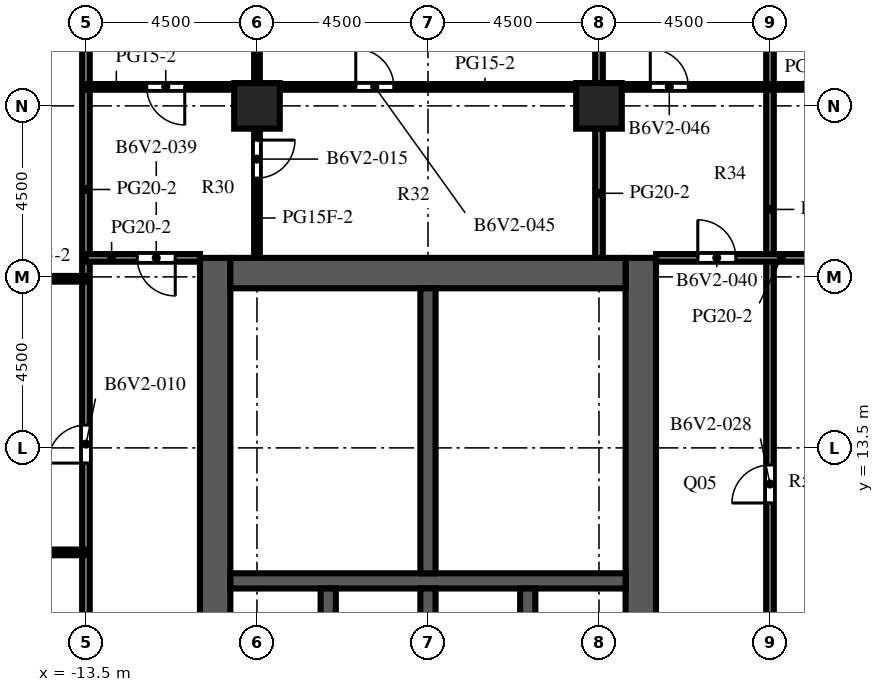
"""IFC4 building model, lengths in metres.
Left out: names, types, materials, properties, quantities, classifications, styles, units other than length and angle.
Written with IfcOpenShell. Run it as: python <this file> out.ifc"""

import sys

from ifc_helpers import new_model, si_unit, direction, frame, frame_2d, origin, origin_2d, place, context, subcontext, project, spatial, rectangle, extrude, element, fill, save


model = new_model("IFC4")
c1 = context("Model", 3, precision=1e-05, world=origin(), true_north=direction((0.0, 1.0)))
c2 = subcontext(c1, "Body", "Model", "MODEL_VIEW")
j1 = project(units=[si_unit("LENGTHUNIT", "METRE"), si_unit("PLANEANGLEUNIT", "RADIAN")], contexts=[c1])
p1 = place(None, origin())
s1 = spatial("IfcSite", under=j1, at=p1, CompositionType="ELEMENT")
p2 = place(p1, origin())
s2 = spatial("IfcBuilding", under=s1, at=p2, CompositionType="ELEMENT")
p3 = place(p2, frame((0.0, 0.0, 216.1)))
s3 = spatial("IfcBuildingStorey", under=s2, at=p3, CompositionType="ELEMENT", Elevation=216.1)
for number, where, z_axis, x_axis in (
    (1, (-9.0, 22.5, 0.0), (0.0, 0.0, 1.0), (1.0, 0.0, 0.0)),
    (2, (0.0, 22.5, 0.0), (0.0, 0.0, 1.0), (1.0, 0.0, 0.0)),
):
    element("IfcColumn", number, at=place(p3, frame(where, z_axis=z_axis, x_axis=x_axis)), inside=s3, PredefinedType="COLUMN", context=c2, shape_type="SweptSolid", body=[
        extrude(rectangle(XDim=1.2, YDim=1.2, at=origin_2d()), origin(), (0.0, 0.0, 1.0), 4.1),
    ])
p4 = place(p3, frame((-10.1, -9.0, 0.0), z_axis=(0.0, 0.0, 1.0), x_axis=(0.0, 1.0, 0.0)))
e3 = element("IfcWall", 3, at=p4, inside=s3, PredefinedType="SHEAR", context=c2, shape_type="SweptSolid", body=[
    extrude(rectangle(XDim=27.5, YDim=0.8, at=frame_2d((13.75, 0.0))), origin(), (0.0, 0.0, 1.0), 4.1),
])
p5 = place(p4, frame((12.55, 0.0, 0.0)))
e4 = element("IfcOpeningElement", 4, at=p5, cuts=e3, PredefinedType="OPENING", context=c2, shape_type="SweptSolid", body=[
    extrude(rectangle(XDim=2.4, YDim=2.4, at=frame_2d((1.2, 1.2))), frame((0.0, 0.41, 0.0), z_axis=(0.0, -1.0, 0.0), x_axis=(1.0, 0.0, 0.0)), (0.0, 0.0, 1.0), 0.82),
])
p6 = place(p4, frame((6.825, 0.0, 0.0)))
e5 = element("IfcOpeningElement", 5, at=p6, cuts=e3, PredefinedType="OPENING", context=c2, shape_type="SweptSolid", body=[
    extrude(rectangle(XDim=1.2, YDim=2.1, at=frame_2d((0.6, 1.05))), frame((0.0, 0.41, 0.0), z_axis=(0.0, -1.0, 0.0), x_axis=(1.0, 0.0, 0.0)), (0.0, 0.0, 1.0), 0.82),
])
p7 = place(p4, frame((19.475, 0.0, 0.0)))
e6 = element("IfcOpeningElement", 6, at=p7, cuts=e3, PredefinedType="OPENING", context=c2, shape_type="SweptSolid", body=[
    extrude(rectangle(XDim=1.2, YDim=2.1, at=frame_2d((0.6, 1.05))), frame((0.0, 0.41, 0.0), z_axis=(0.0, -1.0, 0.0), x_axis=(1.0, 0.0, 0.0)), (0.0, 0.0, 1.0), 0.82),
])
p8 = place(p3, frame((1.1, -9.0, 0.0), z_axis=(0.0, 0.0, 1.0), x_axis=(0.0, 1.0, 0.0)))
e7 = element("IfcWall", 7, at=p8, inside=s3, PredefinedType="SHEAR", context=c2, shape_type="SweptSolid", body=[
    extrude(rectangle(XDim=27.5, YDim=0.8, at=frame_2d((13.75, 0.0))), origin(), (0.0, 0.0, 1.0), 4.1),
])
p9 = place(p8, frame((12.55, 0.0, 0.0)))
e8 = element("IfcOpeningElement", 8, at=p9, cuts=e7, PredefinedType="OPENING", context=c2, shape_type="SweptSolid", body=[
    extrude(rectangle(XDim=2.4, YDim=2.4, at=frame_2d((1.2, 1.2))), frame((0.0, 0.41, 0.0), z_axis=(0.0, -1.0, 0.0), x_axis=(1.0, 0.0, 0.0)), (0.0, 0.0, 1.0), 0.82),
])
p10 = place(p8, frame((5.5, 0.0, 0.0)))
e9 = element("IfcOpeningElement", 9, at=p10, cuts=e7, PredefinedType="OPENING", context=c2, shape_type="SweptSolid", body=[
    extrude(rectangle(XDim=0.95, YDim=2.1, at=frame_2d((0.475, 1.05))), frame((0.0, 0.41, 0.0), z_axis=(0.0, -1.0, 0.0), x_axis=(1.0, 0.0, 0.0)), (0.0, 0.0, 1.0), 0.82),
])
p11 = place(p8, frame((23.475, 0.0, 0.0)))
e10 = element("IfcOpeningElement", 10, at=p11, cuts=e7, PredefinedType="OPENING", context=c2, shape_type="SweptSolid", body=[
    extrude(rectangle(XDim=1.2, YDim=2.1, at=frame_2d((0.6, 1.05))), frame((0.0, 0.41, 0.0), z_axis=(0.0, -1.0, 0.0), x_axis=(1.0, 0.0, 0.0)), (0.0, 0.0, 1.0), 0.82),
])
p12 = place(p3, frame((-9.7, 18.1, 0.0), z_axis=(0.0, 0.0, 1.0), x_axis=(1.0, 0.0, 0.0)))
e11 = element("IfcWall", 11, at=p12, inside=s3, PredefinedType="SHEAR", context=c2, shape_type="SweptSolid", body=[
    extrude(rectangle(XDim=10.4, YDim=0.8, at=frame_2d((5.2, 0.0))), origin(), (0.0, 0.0, 1.0), 4.1),
])
p13 = place(p3, frame((-9.7, 10.0, 0.0), z_axis=(0.0, 0.0, 1.0), x_axis=(1.0, 0.0, 0.0)))
e12 = element("IfcWall", 12, at=p13, inside=s3, PredefinedType="SHEAR", context=c2, shape_type="SweptSolid", body=[
    extrude(rectangle(XDim=10.4, YDim=0.4, at=frame_2d((5.2, 0.0))), origin(), (0.0, 0.0, 1.0), 4.1),
])
for number, where, z_axis, x_axis in (
    (13, (-7.125, 6.9, 0.0), (0.0, 0.0, 1.0), (0.0, 1.0, 0.0)),
    (14, (-4.5, 6.9, 0.0), (0.0, 0.0, 1.0), (0.0, 1.0, 0.0)),
    (15, (-1.875, 6.9, 0.0), (0.0, 0.0, 1.0), (0.0, 1.0, 0.0)),
):
    element("IfcWall", number, at=place(p3, frame(where, z_axis=z_axis, x_axis=x_axis)), inside=s3, PredefinedType="SHEAR", context=c2, shape_type="SweptSolid", body=[
        extrude(rectangle(XDim=2.9, YDim=0.4, at=frame_2d((1.45, 0.0))), origin(), (0.0, 0.0, 1.0), 4.1),
    ])
p14 = place(p3, frame((-4.5, 10.2, 0.0), z_axis=(0.0, 0.0, 1.0), x_axis=(0.0, 1.0, 0.0)))
e16 = element("IfcWall", 16, at=p14, inside=s3, PredefinedType="SHEAR", context=c2, shape_type="SweptSolid", body=[
    extrude(rectangle(XDim=7.5, YDim=0.4, at=frame_2d((3.75, 0.0))), origin(), (0.0, 0.0, 1.0), 4.1),
])
p15 = place(p3, frame((-0.6, 12.45, 0.0), z_axis=(0.0, 0.0, 1.0), x_axis=(1.0, 0.0, 0.0)))
e17 = element("IfcWall", 17, at=p15, inside=s3, PredefinedType="PARTITIONING", context=c2, shape_type="SweptSolid", body=[
    extrude(rectangle(XDim=1.3, YDim=0.1, at=frame_2d((0.65, 0.0))), origin(), (0.0, 0.0, 1.0), 3.5),
])
p16 = place(p15, frame((0.2, 0.0, 0.0)))
e18 = element("IfcOpeningElement", 18, at=p16, cuts=e17, PredefinedType="OPENING", context=c2, shape_type="SweptSolid", body=[
    extrude(rectangle(XDim=0.9, YDim=2.1, at=frame_2d((0.45, 1.05))), frame((0.0, 0.06, 0.0), z_axis=(0.0, -1.0, 0.0), x_axis=(1.0, 0.0, 0.0)), (0.0, 0.0, 1.0), 0.12),
])
p17 = place(p3, frame((-4.3, 12.45, 0.0), z_axis=(0.0, 0.0, 1.0), x_axis=(1.0, 0.0, 0.0)))
e19 = element("IfcWall", 19, at=p17, inside=s3, PredefinedType="PARTITIONING", context=c2, shape_type="SweptSolid", body=[
    extrude(rectangle(XDim=3.7, YDim=0.1, at=frame_2d((1.85, 0.0))), origin(), (0.0, 0.0, 1.0), 3.5),
])
p18 = place(p3, frame((-0.6, 12.45, 0.0), z_axis=(0.0, 0.0, 1.0), x_axis=(0.0, 1.0, 0.0)))
e20 = element("IfcWall", 20, at=p18, inside=s3, PredefinedType="PARTITIONING", context=c2, shape_type="SweptSolid", body=[
    extrude(rectangle(XDim=2.625, YDim=0.1, at=frame_2d((1.312, 0.0))), origin(), (0.0, 0.0, 1.0), 3.5),
])
p19 = place(p18, frame((0.812, 0.0, 0.0)))
e21 = element("IfcOpeningElement", 21, at=p19, cuts=e20, PredefinedType="OPENING", context=c2, shape_type="SweptSolid", body=[
    extrude(rectangle(XDim=1.0, YDim=2.1, at=frame_2d((0.5, 1.05))), frame((0.0, 0.06, 0.0), z_axis=(0.0, -1.0, 0.0), x_axis=(1.0, 0.0, 0.0)), (0.0, 0.0, 1.0), 0.12),
])
p20 = place(p3, frame((-0.6, 15.075, 0.0), z_axis=(0.0, 0.0, 1.0), x_axis=(0.0, 1.0, 0.0)))
e22 = element("IfcWall", 22, at=p20, inside=s3, PredefinedType="PARTITIONING", context=c2, shape_type="SweptSolid", body=[
    extrude(rectangle(XDim=2.625, YDim=0.1, at=frame_2d((1.312, 0.0))), origin(), (0.0, 0.0, 1.0), 3.5),
])
p21 = place(p20, frame((0.812, 0.0, 0.0)))
e23 = element("IfcOpeningElement", 23, at=p21, cuts=e22, PredefinedType="OPENING", context=c2, shape_type="SweptSolid", body=[
    extrude(rectangle(XDim=1.0, YDim=2.1, at=frame_2d((0.5, 1.05))), frame((0.0, 0.06, 0.0), z_axis=(0.0, -1.0, 0.0), x_axis=(1.0, 0.0, 0.0)), (0.0, 0.0, 1.0), 0.12),
])
p22 = place(p3, frame((-4.3, 15.075, 0.0), z_axis=(0.0, 0.0, 1.0), x_axis=(1.0, 0.0, 0.0)))
e24 = element("IfcWall", 24, at=p22, inside=s3, PredefinedType="PARTITIONING", context=c2, shape_type="SweptSolid", body=[
    extrude(rectangle(XDim=3.7, YDim=0.1, at=frame_2d((1.85, 0.0))), origin(), (0.0, 0.0, 1.0), 3.5),
])
p23 = place(p3, frame((-13.5, 6.25, 0.0), z_axis=(0.0, 0.0, 1.0), x_axis=(0.0, 1.0, 0.0)))
e25 = element("IfcWall", 25, at=p23, inside=s3, PredefinedType="PARTITIONING", context=c2, shape_type="SweptSolid", body=[
    extrude(rectangle(XDim=20.25, YDim=0.2, at=frame_2d((10.125, 0.0))), origin(), (0.0, 0.0, 1.0), 3.5),
])
p24 = place(p23, frame((6.85, 0.0, 0.0)))
e26 = element("IfcOpeningElement", 26, at=p24, cuts=e25, PredefinedType="OPENING", context=c2, shape_type="SweptSolid", body=[
    extrude(rectangle(XDim=1.0, YDim=2.1, at=frame_2d((0.5, 1.05))), frame((0.0, 0.11, 0.0), z_axis=(0.0, -1.0, 0.0), x_axis=(1.0, 0.0, 0.0)), (0.0, 0.0, 1.0), 0.22),
])
p25 = place(p3, frame((-9.0, 21.9, 0.0), z_axis=(0.0, 0.0, 1.0), x_axis=(0.0, -1.0, 0.0)))
e27 = element("IfcWall", 27, at=p25, inside=s3, PredefinedType="PARTITIONING", context=c2, shape_type="SweptSolid", body=[
    extrude(rectangle(XDim=3.4, YDim=0.15, at=frame_2d((1.7, 0.0))), origin(), (0.0, 0.0, 1.0), 3.5),
])
p26 = place(p25, frame((0.3, 0.0, 0.0)))
e28 = element("IfcOpeningElement", 28, at=p26, cuts=e27, PredefinedType="OPENING", context=c2, shape_type="SweptSolid", body=[
    extrude(rectangle(XDim=1.0, YDim=2.1, at=frame_2d((0.5, 1.05))), frame((0.0, 0.085, 0.0), z_axis=(0.0, -1.0, 0.0), x_axis=(1.0, 0.0, 0.0)), (0.0, 0.0, 1.0), 0.17),
])
p27 = place(p3, frame((-9.0, 23.1, 0.0), z_axis=(0.0, 0.0, 1.0), x_axis=(0.0, 1.0, 0.0)))
e29 = element("IfcWall", 29, at=p27, inside=s3, PredefinedType="PARTITIONING", context=c2, shape_type="SweptSolid", body=[
    extrude(rectangle(XDim=3.4, YDim=0.15, at=frame_2d((1.7, 0.0))), origin(), (0.0, 0.0, 1.0), 3.5),
])
for number, where, z_axis, x_axis in (
    (30, (0.0, 18.5, 0.0), (0.0, 0.0, 1.0), (0.0, 1.0, 0.0)),
    (31, (0.0, 23.1, 0.0), (0.0, 0.0, 1.0), (0.0, 1.0, 0.0)),
):
    element("IfcWall", number, at=place(p3, frame(where, z_axis=z_axis, x_axis=x_axis)), inside=s3, PredefinedType="PARTITIONING", context=c2, shape_type="SweptSolid", body=[
        extrude(rectangle(XDim=3.4, YDim=0.2, at=frame_2d((1.7, 0.0))), origin(), (0.0, 0.0, 1.0), 3.5),
    ])
p28 = place(p3, frame((4.5, 26.5, 0.0), z_axis=(0.0, 0.0, 1.0), x_axis=(0.0, -1.0, 0.0)))
e32 = element("IfcWall", 32, at=p28, inside=s3, PredefinedType="PARTITIONING", context=c2, shape_type="SweptSolid", body=[
    extrude(rectangle(XDim=19.8, YDim=0.2, at=frame_2d((9.9, 0.0))), origin(), (0.0, 0.0, 1.0), 3.5),
])
p29 = place(p28, frame((13.45, 0.0, 0.0)))
e33 = element("IfcOpeningElement", 33, at=p29, cuts=e32, PredefinedType="OPENING", context=c2, shape_type="SweptSolid", body=[
    extrude(rectangle(XDim=1.0, YDim=2.1, at=frame_2d((0.5, 1.05))), frame((0.0, 0.11, 0.0), z_axis=(0.0, -1.0, 0.0), x_axis=(1.0, 0.0, 0.0)), (0.0, 0.0, 1.0), 0.22),
])
p30 = place(p3, frame((-22.35, 10.75, 0.0), z_axis=(0.0, 0.0, 1.0), x_axis=(1.0, 0.0, 0.0)))
e34 = element("IfcWall", 34, at=p30, inside=s3, PredefinedType="PARTITIONING", context=c2, shape_type="SweptSolid", body=[
    extrude(rectangle(XDim=8.85, YDim=0.15, at=frame_2d((4.425, 0.0))), origin(), (0.0, 0.0, 1.0), 3.5),
])
p31 = place(p30, frame((1.2, 0.0, 0.0)))
e35 = element("IfcOpeningElement", 35, at=p31, cuts=e34, PredefinedType="OPENING", context=c2, shape_type="SweptSolid", body=[
    extrude(rectangle(XDim=1.0, YDim=2.1, at=frame_2d((0.5, 1.05))), frame((0.0, 0.085, 0.0), z_axis=(0.0, -1.0, 0.0), x_axis=(1.0, 0.0, 0.0)), (0.0, 0.0, 1.0), 0.17),
])
p32 = place(p30, frame((5.7, 0.0, 0.0)))
e36 = element("IfcOpeningElement", 36, at=p32, cuts=e34, PredefinedType="OPENING", context=c2, shape_type="SweptSolid", body=[
    extrude(rectangle(XDim=1.0, YDim=2.1, at=frame_2d((0.5, 1.05))), frame((0.0, 0.085, 0.0), z_axis=(0.0, -1.0, 0.0), x_axis=(1.0, 0.0, 0.0)), (0.0, 0.0, 1.0), 0.17),
])
p33 = place(p3, frame((-17.4, 17.95, 0.0), z_axis=(0.0, 0.0, 1.0), x_axis=(1.0, 0.0, 0.0)))
e37 = element("IfcWall", 37, at=p33, inside=s3, PredefinedType="PARTITIONING", context=c2, shape_type="SweptSolid", body=[
    extrude(rectangle(XDim=3.9, YDim=0.15, at=frame_2d((1.95, 0.0))), origin(), (0.0, 0.0, 1.0), 3.5),
])
p34 = place(p33, frame((0.5, 0.0, 0.0)))
e38 = element("IfcOpeningElement", 38, at=p34, cuts=e37, PredefinedType="OPENING", context=c2, shape_type="SweptSolid", body=[
    extrude(rectangle(XDim=1.0, YDim=2.1, at=frame_2d((0.5, 1.05))), frame((0.0, 0.085, 0.0), z_axis=(0.0, -1.0, 0.0), x_axis=(1.0, 0.0, 0.0)), (0.0, 0.0, 1.0), 0.17),
])
p35 = place(p3, frame((-13.5, 18.5, 0.0), z_axis=(0.0, 0.0, 1.0), x_axis=(1.0, 0.0, 0.0)))
e39 = element("IfcWall", 39, at=p35, inside=s3, PredefinedType="PARTITIONING", context=c2, shape_type="SweptSolid", body=[
    extrude(rectangle(XDim=3.0, YDim=0.2, at=frame_2d((1.5, 0.0))), origin(), (0.0, 0.0, 1.0), 3.5),
])
p36 = place(p35, frame((1.35, 0.0, 0.0)))
e40 = element("IfcOpeningElement", 40, at=p36, cuts=e39, PredefinedType="OPENING", context=c2, shape_type="SweptSolid", body=[
    extrude(rectangle(XDim=1.0, YDim=2.1, at=frame_2d((0.5, 1.05))), frame((0.0, 0.11, 0.0), z_axis=(0.0, -1.0, 0.0), x_axis=(1.0, 0.0, 0.0)), (0.0, 0.0, 1.0), 0.22),
])
p37 = place(p3, frame((1.5, 18.5, 0.0), z_axis=(0.0, 0.0, 1.0), x_axis=(1.0, 0.0, 0.0)))
e41 = element("IfcWall", 41, at=p37, inside=s3, PredefinedType="PARTITIONING", context=c2, shape_type="SweptSolid", body=[
    extrude(rectangle(XDim=4.5, YDim=0.2, at=frame_2d((2.25, 0.0))), origin(), (0.0, 0.0, 1.0), 3.5),
])
p38 = place(p37, frame((1.1, 0.0, 0.0)))
e42 = element("IfcOpeningElement", 42, at=p38, cuts=e41, PredefinedType="OPENING", context=c2, shape_type="SweptSolid", body=[
    extrude(rectangle(XDim=1.0, YDim=2.1, at=frame_2d((0.5, 1.05))), frame((0.0, 0.11, 0.0), z_axis=(0.0, -1.0, 0.0), x_axis=(1.0, 0.0, 0.0)), (0.0, 0.0, 1.0), 0.22),
])
p39 = place(p3, frame((-13.5, 23.0, 0.0), z_axis=(0.0, 0.0, 1.0), x_axis=(1.0, 0.0, 0.0)))
e43 = element("IfcWall", 43, at=p39, inside=s3, PredefinedType="PARTITIONING", context=c2, shape_type="SweptSolid", body=[
    extrude(rectangle(XDim=3.9, YDim=0.15, at=frame_2d((1.95, 0.0))), origin(), (0.0, 0.0, 1.0), 3.5),
])
p40 = place(p39, frame((1.6, 0.0, 0.0)))
e44 = element("IfcOpeningElement", 44, at=p40, cuts=e43, PredefinedType="OPENING", context=c2, shape_type="SweptSolid", body=[
    extrude(rectangle(XDim=1.0, YDim=2.1, at=frame_2d((0.5, 1.05))), frame((0.0, 0.085, 0.0), z_axis=(0.0, -1.0, 0.0), x_axis=(1.0, 0.0, 0.0)), (0.0, 0.0, 1.0), 0.17),
])
p41 = place(p3, frame((-8.4, 23.0, 0.0), z_axis=(0.0, 0.0, 1.0), x_axis=(1.0, 0.0, 0.0)))
e45 = element("IfcWall", 45, at=p41, inside=s3, PredefinedType="PARTITIONING", context=c2, shape_type="SweptSolid", body=[
    extrude(rectangle(XDim=7.8, YDim=0.15, at=frame_2d((3.9, 0.0))), origin(), (0.0, 0.0, 1.0), 3.5),
])
p42 = place(p41, frame((2.0, 0.0, 0.0)))
e46 = element("IfcOpeningElement", 46, at=p42, cuts=e45, PredefinedType="OPENING", context=c2, shape_type="SweptSolid", body=[
    extrude(rectangle(XDim=1.0, YDim=2.1, at=frame_2d((0.5, 1.05))), frame((0.0, 0.085, 0.0), z_axis=(0.0, -1.0, 0.0), x_axis=(1.0, 0.0, 0.0)), (0.0, 0.0, 1.0), 0.17),
])
p43 = place(p3, frame((0.6, 23.0, 0.0), z_axis=(0.0, 0.0, 1.0), x_axis=(1.0, 0.0, 0.0)))
e47 = element("IfcWall", 47, at=p43, inside=s3, PredefinedType="PARTITIONING", context=c2, shape_type="SweptSolid", body=[
    extrude(rectangle(XDim=7.8, YDim=0.15, at=frame_2d((3.9, 0.0))), origin(), (0.0, 0.0, 1.0), 3.5),
])
p44 = place(p43, frame((0.75, 0.0, 0.0)))
e48 = element("IfcOpeningElement", 48, at=p44, cuts=e47, PredefinedType="OPENING", context=c2, shape_type="SweptSolid", body=[
    extrude(rectangle(XDim=1.0, YDim=2.1, at=frame_2d((0.5, 1.05))), frame((0.0, 0.085, 0.0), z_axis=(0.0, -1.0, 0.0), x_axis=(1.0, 0.0, 0.0)), (0.0, 0.0, 1.0), 0.17),
])
p45 = place(p7, origin())
e49 = element("IfcDoor", 49, at=p45, inside=s3, OperationType="SINGLE_SWING_LEFT", PredefinedType="DOOR", context=c2, shape_type="SweptSolid", body=[
    extrude(rectangle(XDim=1.2, YDim=2.1, at=frame_2d((0.6, 1.05))), frame((0.0, 0.025, 0.0), z_axis=(0.0, -1.0, 0.0), x_axis=(1.0, 0.0, 0.0)), (0.0, 0.0, 1.0), 0.05),
])
fill(e6, e49)
p46 = place(p16, origin())
e50 = element("IfcDoor", 50, at=p46, inside=s3, OperationType="SINGLE_SWING_LEFT", PredefinedType="DOOR", context=c2, shape_type="SweptSolid", body=[
    extrude(rectangle(XDim=0.9, YDim=2.1, at=frame_2d((0.45, 1.05))), frame((0.0, 0.025, 0.0), z_axis=(0.0, -1.0, 0.0), x_axis=(1.0, 0.0, 0.0)), (0.0, 0.0, 1.0), 0.05),
])
fill(e18, e50)
p47 = place(p11, origin())
e51 = element("IfcDoor", 51, at=p47, inside=s3, OperationType="SINGLE_SWING_RIGHT", PredefinedType="DOOR", context=c2, shape_type="SweptSolid", body=[
    extrude(rectangle(XDim=1.2, YDim=2.1, at=frame_2d((0.6, 1.05))), frame((0.0, 0.375, 0.0), z_axis=(0.0, -1.0, 0.0), x_axis=(1.0, 0.0, 0.0)), (0.0, 0.0, 1.0), 0.05),
])
fill(e10, e51)
p48 = place(p19, origin())
e52 = element("IfcDoor", 52, at=p48, inside=s3, OperationType="SINGLE_SWING_LEFT", PredefinedType="DOOR", context=c2, shape_type="SweptSolid", body=[
    extrude(rectangle(XDim=1.0, YDim=2.1, at=frame_2d((0.5, 1.05))), frame((0.0, 0.025, 0.0), z_axis=(0.0, -1.0, 0.0), x_axis=(1.0, 0.0, 0.0)), (0.0, 0.0, 1.0), 0.05),
])
fill(e21, e52)
p49 = place(p21, origin())
e53 = element("IfcDoor", 53, at=p49, inside=s3, OperationType="SINGLE_SWING_RIGHT", PredefinedType="DOOR", context=c2, shape_type="SweptSolid", body=[
    extrude(rectangle(XDim=1.0, YDim=2.1, at=frame_2d((0.5, 1.05))), frame((0.0, 0.025, 0.0), z_axis=(0.0, -1.0, 0.0), x_axis=(1.0, 0.0, 0.0)), (0.0, 0.0, 1.0), 0.05),
])
fill(e23, e53)
p50 = place(p24, origin())
e54 = element("IfcDoor", 54, at=p50, inside=s3, OperationType="SINGLE_SWING_LEFT", PredefinedType="DOOR", context=c2, shape_type="SweptSolid", body=[
    extrude(rectangle(XDim=1.0, YDim=2.1, at=frame_2d((0.5, 1.05))), frame((0.0, 0.025, 0.0), z_axis=(0.0, -1.0, 0.0), x_axis=(1.0, 0.0, 0.0)), (0.0, 0.0, 1.0), 0.05),
])
fill(e26, e54)
p51 = place(p26, origin())
e55 = element("IfcDoor", 55, at=p51, inside=s3, OperationType="SINGLE_SWING_LEFT", PredefinedType="DOOR", context=c2, shape_type="SweptSolid", body=[
    extrude(rectangle(XDim=1.0, YDim=2.1, at=frame_2d((0.5, 1.05))), frame((0.0, 0.025, 0.0), z_axis=(0.0, -1.0, 0.0), x_axis=(1.0, 0.0, 0.0)), (0.0, 0.0, 1.0), 0.05),
])
fill(e28, e55)
p52 = place(p29, origin())
e56 = element("IfcDoor", 56, at=p52, inside=s3, OperationType="SINGLE_SWING_RIGHT", PredefinedType="DOOR", context=c2, shape_type="SweptSolid", body=[
    extrude(rectangle(XDim=1.0, YDim=2.1, at=frame_2d((0.5, 1.05))), frame((0.0, 0.025, 0.0), z_axis=(0.0, -1.0, 0.0), x_axis=(1.0, 0.0, 0.0)), (0.0, 0.0, 1.0), 0.05),
])
fill(e33, e56)
p53 = place(p36, origin())
e57 = element("IfcDoor", 57, at=p53, inside=s3, OperationType="SINGLE_SWING_RIGHT", PredefinedType="DOOR", context=c2, shape_type="SweptSolid", body=[
    extrude(rectangle(XDim=1.0, YDim=2.1, at=frame_2d((0.5, 1.05))), frame((0.0, 0.025, 0.0), z_axis=(0.0, -1.0, 0.0), x_axis=(1.0, 0.0, 0.0)), (0.0, 0.0, 1.0), 0.05),
])
fill(e40, e57)
p54 = place(p38, origin())
e58 = element("IfcDoor", 58, at=p54, inside=s3, OperationType="SINGLE_SWING_LEFT", PredefinedType="DOOR", context=c2, shape_type="SweptSolid", body=[
    extrude(rectangle(XDim=1.0, YDim=2.1, at=frame_2d((0.5, 1.05))), frame((0.0, 0.025, 0.0), z_axis=(0.0, -1.0, 0.0), x_axis=(1.0, 0.0, 0.0)), (0.0, 0.0, 1.0), 0.05),
])
fill(e42, e58)
p55 = place(p40, origin())
e59 = element("IfcDoor", 59, at=p55, inside=s3, OperationType="SINGLE_SWING_RIGHT", PredefinedType="DOOR", context=c2, shape_type="SweptSolid", body=[
    extrude(rectangle(XDim=1.0, YDim=2.1, at=frame_2d((0.5, 1.05))), frame((0.0, 0.025, 0.0), z_axis=(0.0, -1.0, 0.0), x_axis=(1.0, 0.0, 0.0)), (0.0, 0.0, 1.0), 0.05),
])
fill(e44, e59)
p56 = place(p42, origin())
e60 = element("IfcDoor", 60, at=p56, inside=s3, OperationType="SINGLE_SWING_LEFT", PredefinedType="DOOR", context=c2, shape_type="SweptSolid", body=[
    extrude(rectangle(XDim=1.0, YDim=2.1, at=frame_2d((0.5, 1.05))), frame((0.0, 0.025, 0.0), z_axis=(0.0, -1.0, 0.0), x_axis=(1.0, 0.0, 0.0)), (0.0, 0.0, 1.0), 0.05),
])
fill(e46, e60)
p57 = place(p44, origin())
e61 = element("IfcDoor", 61, at=p57, inside=s3, OperationType="SINGLE_SWING_LEFT", PredefinedType="DOOR", context=c2, shape_type="SweptSolid", body=[
    extrude(rectangle(XDim=1.0, YDim=2.1, at=frame_2d((0.5, 1.05))), frame((0.0, 0.025, 0.0), z_axis=(0.0, -1.0, 0.0), x_axis=(1.0, 0.0, 0.0)), (0.0, 0.0, 1.0), 0.05),
])
fill(e48, e61)
save(model, sys.argv[1])
